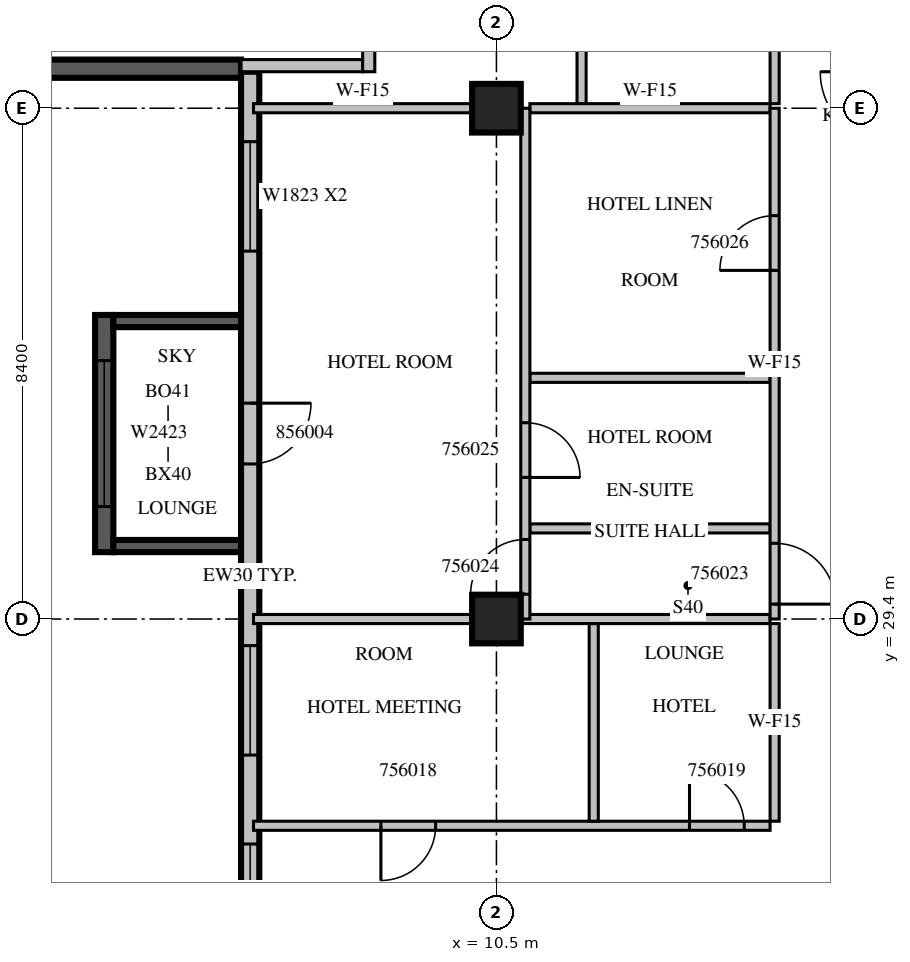
"""IFC4 building model, lengths in metres.
Left out: names, types, materials, properties, quantities, classifications, styles, units other than length and angle.
Written with IfcOpenShell. Run it as: python <this file> out.ifc"""

import sys

from ifc_helpers import new_model, si_unit, direction, frame, frame_2d, origin, origin_2d, place, context, subcontext, project, spatial, rectangle, extrude, source, transform, mapped, element, fill, save


model = new_model("IFC4")
c1 = context("Model", 3, precision=1e-05, world=origin(), true_north=direction((0.0, 1.0)))
c2 = subcontext(c1, "Body", "Model", "MODEL_VIEW")
j1 = project(units=[si_unit("LENGTHUNIT", "METRE"), si_unit("PLANEANGLEUNIT", "RADIAN")], contexts=[c1])
p1 = place(None, origin())
s1 = spatial("IfcSite", under=j1, at=p1, CompositionType="ELEMENT")
p2 = place(p1, origin())
s2 = spatial("IfcBuilding", under=s1, at=p2, CompositionType="ELEMENT")
p3 = place(p2, frame((0.0, 0.0, 246.2)))
s3 = spatial("IfcBuildingStorey", under=s2, at=p3, CompositionType="ELEMENT", Elevation=246.2)
m1 = source(origin(), c2, "Body", "SweptSolid", [
    extrude(rectangle(XDim=0.8, YDim=0.8, at=origin_2d()), origin(), (0.0, 0.0, 1.0), 3.8),
])
for number, where, z_axis, x_axis in (
    (1, (10.5, 29.4, 0.0), (0.0, 0.0, 1.0), (1.0, 0.0, 0.0)),
    (2, (10.5, 37.8, 0.0), (0.0, 0.0, 1.0), (1.0, 0.0, 0.0)),
):
    element("IfcColumn", number, at=place(p3, frame(where, z_axis=z_axis, x_axis=x_axis)), inside=s3, PredefinedType="COLUMN", context=c2, shape_type="MappedRepresentation", body=[
        mapped(m1, transform((0.0, 0.0, 0.0), scale=1.0)),
    ])
m2 = source(origin(), c2, "Body", "SweptSolid", [
    extrude(rectangle(XDim=3.9, YDim=0.3, at=frame_2d((1.95, 0.0))), origin(), (0.0, 0.0, 1.0), 3.4),
])
p4 = place(p3, frame((4.05, 34.4, 0.0), z_axis=(0.0, 0.0, 1.0), x_axis=(0.0, -1.0, 0.0)))
e3 = element("IfcWall", 3, at=p4, inside=s3, PredefinedType="SOLIDWALL", context=c2, shape_type="MappedRepresentation", body=[
    mapped(m2, transform((0.0, 0.0, 0.0), scale=1.0)),
])
m3 = source(origin(), c2, "Body", "SweptSolid", [
    extrude(rectangle(XDim=2.4, YDim=2.3, at=frame_2d((1.2, 1.15))), frame((0.0, 0.16, 0.0), z_axis=(0.0, -1.0, 0.0), x_axis=(1.0, 0.0, 0.0)), (0.0, 0.0, 1.0), 0.32),
])
p5 = place(p4, frame((0.75, 0.0, 0.6)))
e4 = element("IfcOpeningElement", 4, at=p5, cuts=e3, PredefinedType="OPENING", context=c2, shape_type="MappedRepresentation", body=[
    mapped(m3, transform((0.0, 0.0, 0.0), scale=1.0)),
])
m4 = source(origin(), c2, "Body", "SweptSolid", [
    extrude(rectangle(XDim=2.1, YDim=0.2, at=frame_2d((1.05, 0.0))), origin(), (0.0, 0.0, 1.0), 3.4),
])
for number, where, z_axis, x_axis in (
    (5, (6.3, 34.3, 0.0), (0.0, 0.0, 1.0), (-1.0, 0.0, 0.0)),
    (6, (6.3, 30.6, 0.0), (0.0, 0.0, 1.0), (-1.0, 0.0, 0.0)),
):
    element("IfcWall", number, at=place(p3, frame(where, z_axis=z_axis, x_axis=x_axis)), inside=s3, PredefinedType="SOLIDWALL", context=c2, shape_type="MappedRepresentation", body=[
        mapped(m4, transform((0.0, 0.0, 0.0), scale=1.0)),
    ])
m5 = source(origin(), c2, "Body", "SweptSolid", [
    extrude(rectangle(XDim=6.1, YDim=0.3, at=frame_2d((3.05, 0.0))), origin(), (0.0, 0.0, 1.0), 3.4),
])
p6 = place(p3, frame((0.2, 38.45, 0.0), z_axis=(0.0, 0.0, 1.0), x_axis=(1.0, 0.0, 0.0)))
e7 = element("IfcWall", 7, at=p6, inside=s3, PredefinedType="SOLIDWALL", context=c2, shape_type="MappedRepresentation", body=[
    mapped(m5, transform((0.0, 0.0, 0.0), scale=1.0)),
])
m6 = source(origin(), c2, "Body", "SweptSolid", [
    extrude(rectangle(XDim=16.6, YDim=0.3, at=frame_2d((8.3, 0.0))), origin(), (0.0, 0.0, 1.0), 3.4),
])
p7 = place(p3, frame((6.45, 38.4, 0.0), z_axis=(0.0, 0.0, 1.0), x_axis=(0.0, -1.0, 0.0)))
e8 = element("IfcWall", 8, at=p7, inside=s3, PredefinedType="STANDARD", context=c2, shape_type="MappedRepresentation", body=[
    mapped(m6, transform((0.0, 0.0, 0.0), scale=1.0)),
])
m7 = source(origin(), c2, "Body", "SweptSolid", [
    extrude(rectangle(XDim=1.8, YDim=2.3, at=frame_2d((0.9, 1.15))), frame((0.0, 0.16, 0.0), z_axis=(0.0, -1.0, 0.0), x_axis=(1.0, 0.0, 0.0)), (0.0, 0.0, 1.0), 0.32),
])
p8 = place(p7, frame((1.15, 0.0, 0.6)))
e9 = element("IfcOpeningElement", 9, at=p8, cuts=e8, PredefinedType="OPENING", context=c2, shape_type="MappedRepresentation", body=[
    mapped(m7, transform((0.0, 0.0, 0.0), scale=1.0)),
])
p9 = place(p7, frame((9.438, 0.0, 0.6)))
e10 = element("IfcOpeningElement", 10, at=p9, cuts=e8, PredefinedType="OPENING", context=c2, shape_type="MappedRepresentation", body=[
    mapped(m7, transform((0.0, 0.0, 0.0), scale=1.0)),
])
m8 = source(origin(), c2, "Body", "SweptSolid", [
    extrude(rectangle(XDim=3.0, YDim=2.3, at=frame_2d((1.5, 1.15))), frame((0.0, 0.16, 0.0), z_axis=(0.0, -1.0, 0.0), x_axis=(1.0, 0.0, 0.0)), (0.0, 0.0, 1.0), 0.32),
])
p10 = place(p7, frame((12.7, 0.0, 0.6)))
e11 = element("IfcOpeningElement", 11, at=p10, cuts=e8, PredefinedType="OPENING", context=c2, shape_type="MappedRepresentation", body=[
    mapped(m8, transform((0.0, 0.0, 0.0), scale=1.0)),
])
m9 = source(origin(), c2, "Body", "SweptSolid", [
    extrude(rectangle(XDim=1.0, YDim=2.1, at=frame_2d((0.5, 1.05))), frame((0.0, 0.16, 0.0), z_axis=(0.0, -1.0, 0.0), x_axis=(1.0, 0.0, 0.0)), (0.0, 0.0, 1.0), 0.32),
])
p11 = place(p7, frame((5.45, 0.0, 0.0)))
e12 = element("IfcOpeningElement", 12, at=p11, cuts=e8, PredefinedType="OPENING", context=c2, shape_type="MappedRepresentation", body=[
    mapped(m9, transform((0.0, 0.0, 0.0), scale=1.0)),
])
m10 = source(origin(), c2, "Body", "SweptSolid", [
    extrude(rectangle(XDim=2.0, YDim=0.2, at=frame_2d((1.0, 0.0))), origin(), (0.0, 0.0, 1.0), 3.4),
])
p12 = place(p3, frame((6.3, 38.5, 0.0), z_axis=(0.0, 0.0, 1.0), x_axis=(1.0, 0.0, 0.0)))
e13 = element("IfcWall", 13, at=p12, inside=s3, PredefinedType="PARTITIONING", context=c2, shape_type="MappedRepresentation", body=[
    mapped(m10, transform((0.0, 0.0, 0.0), scale=1.0)),
])
m11 = source(origin(), c2, "Body", "SweptSolid", [
    extrude(rectangle(XDim=5.45, YDim=0.2, at=frame_2d((2.725, 0.0))), origin(), (0.0, 0.0, 1.0), 3.4),
])
p13 = place(p3, frame((8.4, 38.4, 0.0), z_axis=(0.0, 0.0, 1.0), x_axis=(0.0, 1.0, 0.0)))
e14 = element("IfcWall", 14, at=p13, inside=s3, PredefinedType="PARTITIONING", context=c2, shape_type="MappedRepresentation", body=[
    mapped(m11, transform((0.0, 0.0, 0.0), scale=1.0)),
])
m12 = source(origin(), c2, "Body", "SweptSolid", [
    extrude(rectangle(XDim=1.2, YDim=2.1, at=frame_2d((0.6, 1.05))), frame((0.0, 0.11, 0.0), z_axis=(0.0, -1.0, 0.0), x_axis=(1.0, 0.0, 0.0)), (0.0, 0.0, 1.0), 0.22),
])
p14 = place(p13, frame((0.4, 0.0, 0.0)))
e15 = element("IfcOpeningElement", 15, at=p14, cuts=e14, PredefinedType="OPENING", context=c2, shape_type="MappedRepresentation", body=[
    mapped(m12, transform((0.0, 0.0, 0.0), scale=1.0)),
])
m13 = source(origin(), c2, "Body", "SweptSolid", [
    extrude(rectangle(XDim=0.9, YDim=2.1, at=frame_2d((0.45, 1.05))), frame((0.0, 0.11, 0.0), z_axis=(0.0, -1.0, 0.0), x_axis=(1.0, 0.0, 0.0)), (0.0, 0.0, 1.0), 0.22),
])
p15 = place(p13, frame((3.25, 0.0, 0.0)))
e16 = element("IfcOpeningElement", 16, at=p15, cuts=e14, PredefinedType="OPENING", context=c2, shape_type="MappedRepresentation", body=[
    mapped(m13, transform((0.0, 0.0, 0.0), scale=1.0)),
])
m14 = source(origin(), c2, "Body", "SweptSolid", [
    extrude(rectangle(XDim=8.495, YDim=0.15, at=frame_2d((4.247, 0.0))), origin(), (0.0, 0.0, 1.0), 3.4),
])
p16 = place(p3, frame((6.505, 26.0, 0.0), z_axis=(0.0, 0.0, 1.0), x_axis=(1.0, 0.0, 0.0)))
e17 = element("IfcWall", 17, at=p16, inside=s3, PredefinedType="PARTITIONING", context=c2, shape_type="MappedRepresentation", body=[
    mapped(m14, transform((0.0, 0.0, 0.0), scale=1.0)),
])
m15 = source(origin(), c2, "Body", "SweptSolid", [
    extrude(rectangle(XDim=0.9, YDim=2.1, at=frame_2d((0.45, 1.05))), frame((0.0, 0.085, 0.0), z_axis=(0.0, -1.0, 0.0), x_axis=(1.0, 0.0, 0.0)), (0.0, 0.0, 1.0), 0.17),
])
p17 = place(p16, frame((2.095, 0.0, 0.0)))
e18 = element("IfcOpeningElement", 18, at=p17, cuts=e17, PredefinedType="OPENING", context=c2, shape_type="MappedRepresentation", body=[
    mapped(m15, transform((0.0, 0.0, 0.0), scale=1.0)),
])
p18 = place(p16, frame((7.17, 0.0, 0.0)))
e19 = element("IfcOpeningElement", 19, at=p18, cuts=e17, PredefinedType="OPENING", context=c2, shape_type="MappedRepresentation", body=[
    mapped(m15, transform((0.0, 0.0, 0.0), scale=1.0)),
])
m16 = source(origin(), c2, "Body", "SweptSolid", [
    extrude(rectangle(XDim=3.25, YDim=0.15, at=frame_2d((1.625, 0.0))), origin(), (0.0, 0.0, 1.0), 3.4),
])
for number, where, z_axis, x_axis in (
    (20, (12.1, 26.075, 0.0), (0.0, 0.0, 1.0), (0.0, 1.0, 0.0)),
    (21, (15.075, 26.075, 0.0), (0.0, 0.0, 1.0), (0.0, 1.0, 0.0)),
):
    element("IfcWall", number, at=place(p3, frame(where, z_axis=z_axis, x_axis=x_axis)), inside=s3, PredefinedType="PARTITIONING", context=c2, shape_type="MappedRepresentation", body=[
        mapped(m16, transform((0.0, 0.0, 0.0), scale=1.0)),
    ])
m17 = source(origin(), c2, "Body", "SweptSolid", [
    extrude(rectangle(XDim=3.596, YDim=0.15, at=frame_2d((1.798, 0.0))), origin(), (0.0, 0.0, 1.0), 3.4),
])
p19 = place(p3, frame((10.101, 29.4, 0.0), z_axis=(0.0, 0.0, 1.0), x_axis=(-1.0, 0.0, 0.0)))
e22 = element("IfcWall", 22, at=p19, inside=s3, PredefinedType="PARTITIONING", context=c2, shape_type="MappedRepresentation", body=[
    mapped(m17, transform((0.0, 0.0, 0.0), scale=1.0)),
])
m18 = source(origin(), c2, "Body", "SweptSolid", [
    extrude(rectangle(XDim=4.101, YDim=0.15, at=frame_2d((2.05, 0.0))), origin(), (0.0, 0.0, 1.0), 3.4),
])
p20 = place(p3, frame((15.0, 29.4, 0.0), z_axis=(0.0, 0.0, 1.0), x_axis=(-1.0, 0.0, 0.0)))
e23 = element("IfcWall", 23, at=p20, inside=s3, PredefinedType="PARTITIONING", context=c2, shape_type="MappedRepresentation", body=[
    mapped(m18, transform((0.0, 0.0, 0.0), scale=1.0)),
])
m19 = source(origin(), c2, "Body", "SweptSolid", [
    extrude(rectangle(XDim=6.45, YDim=0.15, at=frame_2d((3.225, 0.0))), origin(), (0.0, 0.0, 1.0), 3.4),
])
p21 = place(p3, frame((11.9, 44.325, 0.0), z_axis=(0.0, 0.0, 1.0), x_axis=(0.0, -1.0, 0.0)))
e24 = element("IfcWall", 24, at=p21, inside=s3, PredefinedType="PARTITIONING", context=c2, shape_type="MappedRepresentation", body=[
    mapped(m19, transform((0.0, 0.0, 0.0), scale=1.0)),
])
p22 = place(p3, frame((15.075, 37.875, 0.0), z_axis=(0.0, 0.0, 1.0), x_axis=(0.0, 1.0, 0.0)))
e25 = element("IfcWall", 25, at=p22, inside=s3, PredefinedType="PARTITIONING", context=c2, shape_type="MappedRepresentation", body=[
    mapped(m19, transform((0.0, 0.0, 0.0), scale=1.0)),
])
p23 = place(p22, frame((2.737, 0.0, 0.0)))
e26 = element("IfcOpeningElement", 26, at=p23, cuts=e25, PredefinedType="OPENING", context=c2, shape_type="MappedRepresentation", body=[
    mapped(m15, transform((0.0, 0.0, 0.0), scale=1.0)),
])
m20 = source(origin(), c2, "Body", "SweptSolid", [
    extrude(rectangle(XDim=3.95, YDim=0.15, at=frame_2d((1.975, 0.0))), origin(), (0.0, 0.0, 1.0), 3.4),
])
for number, where, z_axis, x_axis in (
    (27, (15.0, 30.89, 0.0), (0.0, 0.0, 1.0), (-1.0, 0.0, 0.0)),
    (28, (15.0, 33.367, 0.0), (0.0, 0.0, 1.0), (-1.0, 0.0, 0.0)),
):
    element("IfcWall", number, at=place(p3, frame(where, z_axis=z_axis, x_axis=x_axis)), inside=s3, PredefinedType="PARTITIONING", context=c2, shape_type="MappedRepresentation", body=[
        mapped(m20, transform((0.0, 0.0, 0.0), scale=1.0)),
    ])
p24 = place(p3, frame((10.101, 37.8, 0.0), z_axis=(0.0, 0.0, 1.0), x_axis=(-1.0, 0.0, 0.0)))
e29 = element("IfcWall", 29, at=p24, inside=s3, PredefinedType="PARTITIONING", context=c2, shape_type="MappedRepresentation", body=[
    mapped(m17, transform((0.0, 0.0, 0.0), scale=1.0)),
])
p25 = place(p3, frame((15.0, 37.8, 0.0), z_axis=(0.0, 0.0, 1.0), x_axis=(-1.0, 0.0, 0.0)))
e30 = element("IfcWall", 30, at=p25, inside=s3, PredefinedType="PARTITIONING", context=c2, shape_type="MappedRepresentation", body=[
    mapped(m20, transform((0.0, 0.0, 0.0), scale=1.0)),
])
m21 = source(origin(), c2, "Body", "SweptSolid", [
    extrude(rectangle(XDim=8.4, YDim=0.15, at=frame_2d((4.2, 0.0))), origin(), (0.0, 0.0, 1.0), 3.4),
])
p26 = place(p3, frame((10.975, 29.4, 0.0), z_axis=(0.0, 0.0, 1.0), x_axis=(0.0, 1.0, 0.0)))
e31 = element("IfcWall", 31, at=p26, inside=s3, PredefinedType="PARTITIONING", context=c2, shape_type="MappedRepresentation", body=[
    mapped(m21, transform((0.0, 0.0, 0.0), scale=1.0)),
])
p27 = place(p26, frame((0.408, 0.0, 0.0)))
e32 = element("IfcOpeningElement", 32, at=p27, cuts=e31, PredefinedType="OPENING", context=c2, shape_type="MappedRepresentation", body=[
    mapped(m15, transform((0.0, 0.0, 0.0), scale=1.0)),
])
p28 = place(p26, frame((2.328, 0.0, 0.0)))
e33 = element("IfcOpeningElement", 33, at=p28, cuts=e31, PredefinedType="OPENING", context=c2, shape_type="MappedRepresentation", body=[
    mapped(m15, transform((0.0, 0.0, 0.0), scale=1.0)),
])
p29 = place(p3, frame((15.075, 29.4, 0.0), z_axis=(0.0, 0.0, 1.0), x_axis=(0.0, 1.0, 0.0)))
e34 = element("IfcWall", 34, at=p29, inside=s3, PredefinedType="PARTITIONING", context=c2, shape_type="MappedRepresentation", body=[
    mapped(m21, transform((0.0, 0.0, 0.0), scale=1.0)),
])
m22 = source(origin(), c2, "Body", "SweptSolid", [
    extrude(rectangle(XDim=1.0, YDim=2.1, at=frame_2d((0.5, 1.05))), frame((0.0, 0.085, 0.0), z_axis=(0.0, -1.0, 0.0), x_axis=(1.0, 0.0, 0.0)), (0.0, 0.0, 1.0), 0.17),
])
p30 = place(p29, frame((0.245, 0.0, 0.0)))
e35 = element("IfcOpeningElement", 35, at=p30, cuts=e34, PredefinedType="OPENING", context=c2, shape_type="MappedRepresentation", body=[
    mapped(m22, transform((0.0, 0.0, 0.0), scale=1.0)),
])
p31 = place(p29, frame((5.733, 0.0, 0.0)))
e36 = element("IfcOpeningElement", 36, at=p31, cuts=e34, PredefinedType="OPENING", context=c2, shape_type="MappedRepresentation", body=[
    mapped(m15, transform((0.0, 0.0, 0.0), scale=1.0)),
])
m23 = source(origin(), c2, "Body", "SweptSolid", [
    extrude(rectangle(XDim=2.4, YDim=2.3, at=frame_2d((1.2, 1.15))), frame((0.0, 0.03, 0.0), z_axis=(0.0, -1.0, 0.0), x_axis=(1.0, 0.0, 0.0)), (0.0, 0.0, 1.0), 0.06),
])
p32 = place(p5, origin())
e37 = element("IfcWindow", 37, at=p32, inside=s3, PartitioningType="SINGLE_PANEL", PredefinedType="WINDOW", context=c2, shape_type="MappedRepresentation", body=[
    mapped(m23, transform((0.0, 0.0, 0.0), scale=1.0)),
])
fill(e4, e37)
m24 = source(origin(), c2, "Body", "SweptSolid", [
    extrude(rectangle(XDim=1.8, YDim=2.3, at=frame_2d((0.9, 1.15))), frame((0.0, 0.03, 0.0), z_axis=(0.0, -1.0, 0.0), x_axis=(1.0, 0.0, 0.0)), (0.0, 0.0, 1.0), 0.06),
])
p33 = place(p8, origin())
e38 = element("IfcWindow", 38, at=p33, inside=s3, PartitioningType="SINGLE_PANEL", PredefinedType="WINDOW", context=c2, shape_type="MappedRepresentation", body=[
    mapped(m24, transform((0.0, 0.0, 0.0), scale=1.0)),
])
fill(e9, e38)
p34 = place(p9, origin())
e39 = element("IfcWindow", 39, at=p34, inside=s3, PartitioningType="SINGLE_PANEL", PredefinedType="WINDOW", context=c2, shape_type="MappedRepresentation", body=[
    mapped(m24, transform((0.0, 0.0, 0.0), scale=1.0)),
])
fill(e10, e39)
m25 = source(origin(), c2, "Body", "SweptSolid", [
    extrude(rectangle(XDim=3.0, YDim=2.3, at=frame_2d((1.5, 1.15))), frame((0.0, 0.03, 0.0), z_axis=(0.0, -1.0, 0.0), x_axis=(1.0, 0.0, 0.0)), (0.0, 0.0, 1.0), 0.06),
])
p35 = place(p10, origin())
e40 = element("IfcWindow", 40, at=p35, inside=s3, PartitioningType="SINGLE_PANEL", PredefinedType="WINDOW", context=c2, shape_type="MappedRepresentation", body=[
    mapped(m25, transform((0.0, 0.0, 0.0), scale=1.0)),
])
fill(e11, e40)
m26 = source(origin(), c2, "Body", "SweptSolid", [
    extrude(rectangle(XDim=0.9, YDim=2.1, at=frame_2d((0.45, 1.05))), frame((0.0, 0.025, 0.0), z_axis=(0.0, -1.0, 0.0), x_axis=(1.0, 0.0, 0.0)), (0.0, 0.0, 1.0), 0.05),
])
p36 = place(p17, origin())
e41 = element("IfcDoor", 41, at=p36, inside=s3, OperationType="SINGLE_SWING_RIGHT", PredefinedType="DOOR", context=c2, shape_type="MappedRepresentation", body=[
    mapped(m26, transform((0.0, 0.0, 0.0), scale=1.0)),
])
fill(e18, e41)
p37 = place(p18, origin())
e42 = element("IfcDoor", 42, at=p37, inside=s3, OperationType="SINGLE_SWING_LEFT", PredefinedType="DOOR", context=c2, shape_type="MappedRepresentation", body=[
    mapped(m26, transform((0.0, 0.0, 0.0), scale=1.0)),
])
fill(e19, e42)
m27 = source(origin(), c2, "Body", "SweptSolid", [
    extrude(rectangle(XDim=1.0, YDim=2.1, at=frame_2d((0.5, 1.05))), frame((0.0, 0.025, 0.0), z_axis=(0.0, -1.0, 0.0), x_axis=(1.0, 0.0, 0.0)), (0.0, 0.0, 1.0), 0.05),
])
p38 = place(p30, origin())
e43 = element("IfcDoor", 43, at=p38, inside=s3, OperationType="SINGLE_SWING_RIGHT", PredefinedType="DOOR", context=c2, shape_type="MappedRepresentation", body=[
    mapped(m27, transform((0.0, 0.0, 0.0), scale=1.0)),
])
fill(e35, e43)
p39 = place(p27, origin())
e44 = element("IfcDoor", 44, at=p39, inside=s3, OperationType="SINGLE_SWING_LEFT", PredefinedType="DOOR", context=c2, shape_type="MappedRepresentation", body=[
    mapped(m26, transform((0.0, 0.0, 0.0), scale=1.0)),
])
fill(e32, e44)
p40 = place(p28, origin())
e45 = element("IfcDoor", 45, at=p40, inside=s3, OperationType="SINGLE_SWING_RIGHT", PredefinedType="DOOR", context=c2, shape_type="MappedRepresentation", body=[
    mapped(m26, transform((0.0, 0.0, 0.0), scale=1.0)),
])
fill(e33, e45)
p41 = place(p31, origin())
e46 = element("IfcDoor", 46, at=p41, inside=s3, OperationType="SINGLE_SWING_LEFT", PredefinedType="DOOR", context=c2, shape_type="MappedRepresentation", body=[
    mapped(m26, transform((0.0, 0.0, 0.0), scale=1.0)),
])
fill(e36, e46)
p42 = place(p11, origin())
e47 = element("IfcDoor", 47, at=p42, inside=s3, OperationType="SINGLE_SWING_LEFT", PredefinedType="DOOR", context=c2, shape_type="MappedRepresentation", body=[
    mapped(m27, transform((0.0, 0.0, 0.0), scale=1.0)),
])
fill(e12, e47)
save(model, sys.argv[1])
